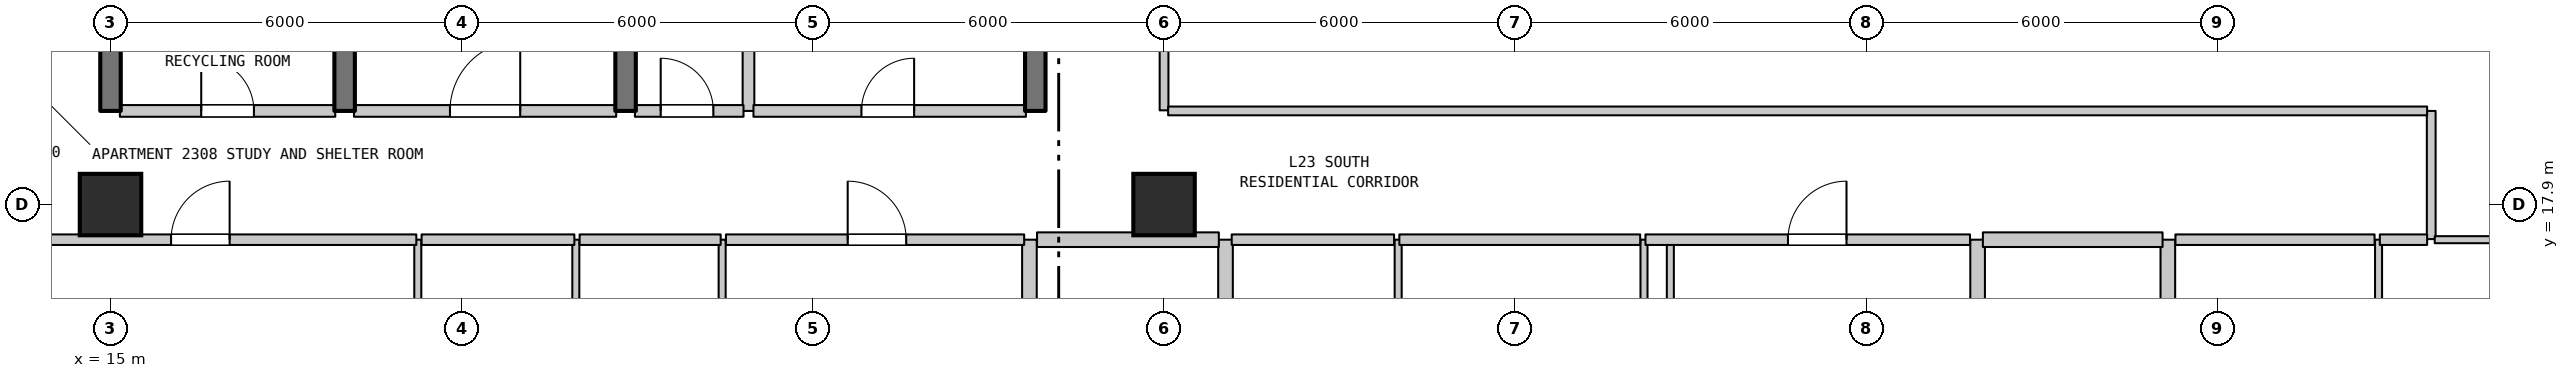
"""IFC4 building model, lengths in metres.
Left out: names, types, materials, properties, quantities, classifications, styles, units other than length and angle.
Written with IfcOpenShell. Run it as: python <this file> out.ifc"""

import sys

from ifc_helpers import new_model, si_unit, direction, frame, frame_2d, origin, origin_2d, place, context, subcontext, project, spatial, rectangle, extrude, element, fill, save


model = new_model("IFC4")
c1 = context("Model", 3, precision=1e-05, world=origin(), true_north=direction((0.0, 1.0)))
c2 = subcontext(c1, "Body", "Model", "MODEL_VIEW")
j1 = project(units=[si_unit("LENGTHUNIT", "METRE"), si_unit("PLANEANGLEUNIT", "RADIAN")], contexts=[c1])
p1 = place(None, origin())
s1 = spatial("IfcSite", under=j1, at=p1, CompositionType="ELEMENT")
p2 = place(p1, origin())
s2 = spatial("IfcBuilding", under=s1, at=p2, CompositionType="ELEMENT")
p3 = place(p2, frame((0.0, 0.0, 98.3)))
s3 = spatial("IfcBuildingStorey", under=s2, at=p3, CompositionType="ELEMENT", Elevation=98.3)
for number, where, z_axis, x_axis in (
    (1, (15.0, 17.9, 0.0), (0.0, 0.0, 1.0), (1.0, 0.0, 0.0)),
    (2, (33.0, 17.9, 0.0), (0.0, 0.0, 1.0), (1.0, 0.0, 0.0)),
):
    element("IfcColumn", number, at=place(p3, frame(where, z_axis=z_axis, x_axis=x_axis)), inside=s3, PredefinedType="COLUMN", context=c2, shape_type="SweptSolid", body=[
        extrude(rectangle(XDim=1.05, YDim=1.05, at=origin_2d()), origin(), (0.0, 0.0, 1.0), 3.7),
    ])
for number, where, z_axis, x_axis in (
    (3, (15.0, 19.5, 0.0), (0.0, 0.0, 1.0), (0.0, 1.0, 0.0)),
    (4, (19.0, 19.5, 0.0), (0.0, 0.0, 1.0), (0.0, 1.0, 0.0)),
):
    element("IfcWall", number, at=place(p3, frame(where, z_axis=z_axis, x_axis=x_axis)), inside=s3, PredefinedType="SHEAR", context=c2, shape_type="SweptSolid", body=[
        extrude(rectangle(XDim=3.2, YDim=0.35, at=frame_2d((1.6, 0.0))), origin(), (0.0, 0.0, 1.0), 3.385),
    ])
p4 = place(p3, frame((20.25, 14.1, 0.0), z_axis=(0.0, 0.0, 1.0), x_axis=(0.0, 1.0, 0.0)))
e5 = element("IfcWall", 5, at=p4, inside=s3, PredefinedType="PARTITIONING", context=c2, shape_type="SweptSolid", body=[
    extrude(rectangle(XDim=3.2, YDim=0.12, at=frame_2d((1.6, 0.0))), origin(), (0.0, 0.0, 1.0), 3.385),
])
p5 = place(p4, frame((1.15, 0.0, 0.0)))
e6 = element("IfcOpeningElement", 6, at=p5, cuts=e5, PredefinedType="OPENING", context=c2, shape_type="SweptSolid", body=[
    extrude(rectangle(XDim=0.9, YDim=2.15, at=frame_2d((0.45, 1.075))), frame((0.0, 0.07, 0.0), z_axis=(0.0, -1.0, 0.0), x_axis=(1.0, 0.0, 0.0)), (0.0, 0.0, 1.0), 0.14),
])
p6 = place(p3, frame((22.95, 14.1, 0.0), z_axis=(0.0, 0.0, 1.0), x_axis=(0.0, 1.0, 0.0)))
e7 = element("IfcWall", 7, at=p6, inside=s3, PredefinedType="PARTITIONING", context=c2, shape_type="SweptSolid", body=[
    extrude(rectangle(XDim=3.2, YDim=0.12, at=frame_2d((1.6, 0.0))), origin(), (0.0, 0.0, 1.0), 3.385),
])
p7 = place(p3, frame((23.8, 19.5, 0.0), z_axis=(0.0, 0.0, 1.0), x_axis=(0.0, 1.0, 0.0)))
e8 = element("IfcWall", 8, at=p7, inside=s3, PredefinedType="SHEAR", context=c2, shape_type="SweptSolid", body=[
    extrude(rectangle(XDim=3.2, YDim=0.35, at=frame_2d((1.6, 0.0))), origin(), (0.0, 0.0, 1.0), 3.385),
])
p8 = place(p3, frame((25.45, 14.85, 0.0), z_axis=(0.0, 0.0, 1.0), x_axis=(0.0, 1.0, 0.0)))
e9 = element("IfcWall", 9, at=p8, inside=s3, PredefinedType="PARTITIONING", context=c2, shape_type="SweptSolid", body=[
    extrude(rectangle(XDim=2.45, YDim=0.12, at=frame_2d((1.225, 0.0))), origin(), (0.0, 0.0, 1.0), 3.385),
])
p9 = place(p3, frame((25.9, 19.5, 0.0), z_axis=(0.0, 0.0, 1.0), x_axis=(0.0, 1.0, 0.0)))
e10 = element("IfcWall", 10, at=p9, inside=s3, PredefinedType="STANDARD", context=c2, shape_type="SweptSolid", body=[
    extrude(rectangle(XDim=3.2, YDim=0.2, at=frame_2d((1.6, 0.0))), origin(), (0.0, 0.0, 1.0), 3.385),
])
p10 = place(p3, frame((30.7, 11.15, 0.0), z_axis=(0.0, 0.0, 1.0), x_axis=(0.0, 1.0, 0.0)))
e11 = element("IfcWall", 11, at=p10, inside=s3, PredefinedType="STANDARD", context=c2, shape_type="SweptSolid", body=[
    extrude(rectangle(XDim=6.15, YDim=0.25, at=frame_2d((3.075, 0.0))), origin(), (0.0, 0.0, 1.0), 3.385),
])
p11 = place(p3, frame((30.8, 19.5, 0.0), z_axis=(0.0, 0.0, 1.0), x_axis=(0.0, 1.0, 0.0)))
e12 = element("IfcWall", 12, at=p11, inside=s3, PredefinedType="SHEAR", context=c2, shape_type="SweptSolid", body=[
    extrude(rectangle(XDim=3.2, YDim=0.35, at=frame_2d((1.6, 0.0))), origin(), (0.0, 0.0, 1.0), 3.385),
])
p12 = place(p3, frame((33.0, 19.51, 0.0), z_axis=(0.0, 0.0, 1.0), x_axis=(0.0, 1.0, 0.0)))
e13 = element("IfcWall", 13, at=p12, inside=s3, PredefinedType="STANDARD", context=c2, shape_type="SweptSolid", body=[
    extrude(rectangle(XDim=6.18, YDim=0.15, at=frame_2d((3.09, 0.0))), origin(), (0.0, 0.0, 1.0), 2.935),
])
p13 = place(p3, frame((34.05, 11.15, 0.0), z_axis=(0.0, 0.0, 1.0), x_axis=(0.0, 1.0, 0.0)))
e14 = element("IfcWall", 14, at=p13, inside=s3, PredefinedType="STANDARD", context=c2, shape_type="SweptSolid", body=[
    extrude(rectangle(XDim=6.15, YDim=0.25, at=frame_2d((3.075, 0.0))), origin(), (0.0, 0.0, 1.0), 3.385),
])
for number, where, z_axis, x_axis in (
    (15, (37.0, 11.15, 0.0), (0.0, 0.0, 1.0), (0.0, 1.0, 0.0)),
    (16, (41.2, 11.15, 0.0), (0.0, 0.0, 1.0), (0.0, 1.0, 0.0)),
):
    element("IfcWall", number, at=place(p3, frame(where, z_axis=z_axis, x_axis=x_axis)), inside=s3, PredefinedType="PARTITIONING", context=c2, shape_type="SweptSolid", body=[
        extrude(rectangle(XDim=6.15, YDim=0.12, at=frame_2d((3.075, 0.0))), origin(), (0.0, 0.0, 1.0), 3.385),
    ])
p14 = place(p3, frame((41.65, 14.85, 0.0), z_axis=(0.0, 0.0, 1.0), x_axis=(0.0, 1.0, 0.0)))
e17 = element("IfcWall", 17, at=p14, inside=s3, PredefinedType="PARTITIONING", context=c2, shape_type="SweptSolid", body=[
    extrude(rectangle(XDim=2.45, YDim=0.12, at=frame_2d((1.225, 0.0))), origin(), (0.0, 0.0, 1.0), 3.385),
])
for number, where, z_axis, x_axis in (
    (18, (46.9, 11.15, 0.0), (0.0, 0.0, 1.0), (0.0, 1.0, 0.0)),
    (19, (50.15, 11.15, 0.0), (0.0, 0.0, 1.0), (0.0, 1.0, 0.0)),
):
    element("IfcWall", number, at=place(p3, frame(where, z_axis=z_axis, x_axis=x_axis)), inside=s3, PredefinedType="STANDARD", context=c2, shape_type="SweptSolid", body=[
        extrude(rectangle(XDim=6.15, YDim=0.25, at=frame_2d((3.075, 0.0))), origin(), (0.0, 0.0, 1.0), 3.385),
    ])
p15 = place(p3, frame((53.75, 11.15, 0.0), z_axis=(0.0, 0.0, 1.0), x_axis=(0.0, 1.0, 0.0)))
e20 = element("IfcWall", 20, at=p15, inside=s3, PredefinedType="PARTITIONING", context=c2, shape_type="SweptSolid", body=[
    extrude(rectangle(XDim=6.15, YDim=0.12, at=frame_2d((3.075, 0.0))), origin(), (0.0, 0.0, 1.0), 3.385),
])
p16 = place(p3, frame((54.65, 17.31, 0.0), z_axis=(0.0, 0.0, 1.0), x_axis=(0.0, 1.0, 0.0)))
e21 = element("IfcWall", 21, at=p16, inside=s3, PredefinedType="STANDARD", context=c2, shape_type="SweptSolid", body=[
    extrude(rectangle(XDim=2.19, YDim=0.15, at=frame_2d((1.095, 0.0))), origin(), (0.0, 0.0, 1.0), 3.385),
])
p17 = place(p3, frame((12.875, 17.3, 0.0), z_axis=(0.0, 0.0, 1.0), x_axis=(1.0, 0.0, 0.0)))
e22 = element("IfcWall", 22, at=p17, inside=s3, PredefinedType="STANDARD", context=c2, shape_type="SweptSolid", body=[
    extrude(rectangle(XDim=7.35, YDim=0.18, at=frame_2d((3.675, 0.0))), origin(), (0.0, 0.0, 1.0), 3.385),
])
p18 = place(p17, frame((3.16, 0.0, 0.0)))
e23 = element("IfcOpeningElement", 23, at=p18, cuts=e22, PredefinedType="OPENING", context=c2, shape_type="SweptSolid", body=[
    extrude(rectangle(XDim=1.0, YDim=2.15, at=frame_2d((0.5, 1.075))), frame((0.0, 0.1, 0.0), z_axis=(0.0, -1.0, 0.0), x_axis=(1.0, 0.0, 0.0)), (0.0, 0.0, 1.0), 0.2),
])
p19 = place(p3, frame((20.315, 17.3, 0.0), z_axis=(0.0, 0.0, 1.0), x_axis=(1.0, 0.0, 0.0)))
e24 = element("IfcWall", 24, at=p19, inside=s3, PredefinedType="STANDARD", context=c2, shape_type="SweptSolid", body=[
    extrude(rectangle(XDim=2.61, YDim=0.18, at=frame_2d((1.305, 0.0))), origin(), (0.0, 0.0, 1.0), 3.385),
])
p20 = place(p3, frame((23.015, 17.3, 0.0), z_axis=(0.0, 0.0, 1.0), x_axis=(1.0, 0.0, 0.0)))
e25 = element("IfcWall", 25, at=p20, inside=s3, PredefinedType="STANDARD", context=c2, shape_type="SweptSolid", body=[
    extrude(rectangle(XDim=2.41, YDim=0.18, at=frame_2d((1.205, 0.0))), origin(), (0.0, 0.0, 1.0), 3.385),
])
p21 = place(p3, frame((25.515, 17.3, 0.0), z_axis=(0.0, 0.0, 1.0), x_axis=(1.0, 0.0, 0.0)))
e26 = element("IfcWall", 26, at=p21, inside=s3, PredefinedType="STANDARD", context=c2, shape_type="SweptSolid", body=[
    extrude(rectangle(XDim=5.095, YDim=0.18, at=frame_2d((2.548, 0.0))), origin(), (0.0, 0.0, 1.0), 3.385),
])
p22 = place(p21, frame((2.08, 0.0, 0.0)))
e27 = element("IfcOpeningElement", 27, at=p22, cuts=e26, PredefinedType="OPENING", context=c2, shape_type="SweptSolid", body=[
    extrude(rectangle(XDim=1.0, YDim=2.15, at=frame_2d((0.5, 1.075))), frame((0.0, 0.1, 0.0), z_axis=(0.0, -1.0, 0.0), x_axis=(1.0, 0.0, 0.0)), (0.0, 0.0, 1.0), 0.2),
])
p23 = place(p3, frame((30.83, 17.3, 0.0), z_axis=(0.0, 0.0, 1.0), x_axis=(1.0, 0.0, 0.0)))
e28 = element("IfcWall", 28, at=p23, inside=s3, PredefinedType="STANDARD", context=c2, shape_type="SweptSolid", body=[
    extrude(rectangle(XDim=3.106, YDim=0.25, at=frame_2d((1.553, 0.0))), origin(), (0.0, 0.0, 1.0), 3.385),
])
p24 = place(p3, frame((34.156, 17.3, 0.0), z_axis=(0.0, 0.0, 1.0), x_axis=(1.0, 0.0, 0.0)))
e29 = element("IfcWall", 29, at=p24, inside=s3, PredefinedType="STANDARD", context=c2, shape_type="SweptSolid", body=[
    extrude(rectangle(XDim=2.774, YDim=0.18, at=frame_2d((1.387, 0.0))), origin(), (0.0, 0.0, 1.0), 3.385),
])
p25 = place(p3, frame((37.02, 17.3, 0.0), z_axis=(0.0, 0.0, 1.0), x_axis=(1.0, 0.0, 0.0)))
e30 = element("IfcWall", 30, at=p25, inside=s3, PredefinedType="STANDARD", context=c2, shape_type="SweptSolid", body=[
    extrude(rectangle(XDim=4.115, YDim=0.18, at=frame_2d((2.058, 0.0))), origin(), (0.0, 0.0, 1.0), 3.385),
])
p26 = place(p3, frame((41.225, 17.3, 0.0), z_axis=(0.0, 0.0, 1.0), x_axis=(1.0, 0.0, 0.0)))
e31 = element("IfcWall", 31, at=p26, inside=s3, PredefinedType="STANDARD", context=c2, shape_type="SweptSolid", body=[
    extrude(rectangle(XDim=5.545, YDim=0.18, at=frame_2d((2.772, 0.0))), origin(), (0.0, 0.0, 1.0), 3.385),
])
p27 = place(p26, frame((2.435, 0.0, 0.0)))
e32 = element("IfcOpeningElement", 32, at=p27, cuts=e31, PredefinedType="OPENING", context=c2, shape_type="SweptSolid", body=[
    extrude(rectangle(XDim=1.0, YDim=2.15, at=frame_2d((0.5, 1.075))), frame((0.0, 0.1, 0.0), z_axis=(0.0, -1.0, 0.0), x_axis=(1.0, 0.0, 0.0)), (0.0, 0.0, 1.0), 0.2),
])
p28 = place(p3, frame((46.99, 17.3, 0.0), z_axis=(0.0, 0.0, 1.0), x_axis=(1.0, 0.0, 0.0)))
e33 = element("IfcWall", 33, at=p28, inside=s3, PredefinedType="STANDARD", context=c2, shape_type="SweptSolid", body=[
    extrude(rectangle(XDim=3.07, YDim=0.25, at=frame_2d((1.535, 0.0))), origin(), (0.0, 0.0, 1.0), 3.385),
])
p29 = place(p3, frame((50.28, 17.3, 0.0), z_axis=(0.0, 0.0, 1.0), x_axis=(1.0, 0.0, 0.0)))
e34 = element("IfcWall", 34, at=p29, inside=s3, PredefinedType="STANDARD", context=c2, shape_type="SweptSolid", body=[
    extrude(rectangle(XDim=3.402, YDim=0.18, at=frame_2d((1.701, 0.0))), origin(), (0.0, 0.0, 1.0), 3.385),
])
p30 = place(p3, frame((53.772, 17.3, 0.0), z_axis=(0.0, 0.0, 1.0), x_axis=(1.0, 0.0, 0.0)))
e35 = element("IfcWall", 35, at=p30, inside=s3, PredefinedType="STANDARD", context=c2, shape_type="SweptSolid", body=[
    extrude(rectangle(XDim=0.808, YDim=0.18, at=frame_2d((0.404, 0.0))), origin(), (0.0, 0.0, 1.0), 3.385),
])
p31 = place(p3, frame((54.71, 17.3, 0.0), z_axis=(0.0, 0.0, 1.0), x_axis=(1.0, 0.0, 0.0)))
e36 = element("IfcWall", 36, at=p31, inside=s3, PredefinedType="PARTITIONING", context=c2, shape_type="SweptSolid", body=[
    extrude(rectangle(XDim=1.635, YDim=0.12, at=frame_2d((0.817, 0.0))), origin(), (0.0, 0.0, 1.0), 3.385),
])
p32 = place(p3, frame((15.16, 19.5, 0.0), z_axis=(0.0, 0.0, 1.0), x_axis=(1.0, 0.0, 0.0)))
e37 = element("IfcWall", 37, at=p32, inside=s3, PredefinedType="STANDARD", context=c2, shape_type="SweptSolid", body=[
    extrude(rectangle(XDim=3.68, YDim=0.2, at=frame_2d((1.84, 0.0))), origin(), (0.0, 0.0, 1.0), 3.385),
])
p33 = place(p32, frame((1.39, 0.0, 0.0)))
e38 = element("IfcOpeningElement", 38, at=p33, cuts=e37, PredefinedType="OPENING", context=c2, shape_type="SweptSolid", body=[
    extrude(rectangle(XDim=0.9, YDim=2.15, at=frame_2d((0.45, 1.075))), frame((0.0, 0.11, 0.0), z_axis=(0.0, -1.0, 0.0), x_axis=(1.0, 0.0, 0.0)), (0.0, 0.0, 1.0), 0.22),
])
p34 = place(p3, frame((19.16, 19.5, 0.0), z_axis=(0.0, 0.0, 1.0), x_axis=(1.0, 0.0, 0.0)))
e39 = element("IfcWall", 39, at=p34, inside=s3, PredefinedType="STANDARD", context=c2, shape_type="SweptSolid", body=[
    extrude(rectangle(XDim=4.48, YDim=0.2, at=frame_2d((2.24, 0.0))), origin(), (0.0, 0.0, 1.0), 3.385),
])
p35 = place(p34, frame((1.64, 0.0, 0.0)))
e40 = element("IfcOpeningElement", 40, at=p35, cuts=e39, PredefinedType="OPENING", context=c2, shape_type="SweptSolid", body=[
    extrude(rectangle(XDim=1.2, YDim=2.2, at=frame_2d((0.6, 1.1))), frame((0.0, 0.11, 0.0), z_axis=(0.0, -1.0, 0.0), x_axis=(1.0, 0.0, 0.0)), (0.0, 0.0, 1.0), 0.22),
])
p36 = place(p3, frame((23.96, 19.5, 0.0), z_axis=(0.0, 0.0, 1.0), x_axis=(1.0, 0.0, 0.0)))
e41 = element("IfcWall", 41, at=p36, inside=s3, PredefinedType="STANDARD", context=c2, shape_type="SweptSolid", body=[
    extrude(rectangle(XDim=1.855, YDim=0.2, at=frame_2d((0.927, 0.0))), origin(), (0.0, 0.0, 1.0), 3.385),
])
p37 = place(p36, frame((0.44, 0.0, 0.0)))
e42 = element("IfcOpeningElement", 42, at=p37, cuts=e41, PredefinedType="OPENING", context=c2, shape_type="SweptSolid", body=[
    extrude(rectangle(XDim=0.9, YDim=2.15, at=frame_2d((0.45, 1.075))), frame((0.0, 0.11, 0.0), z_axis=(0.0, -1.0, 0.0), x_axis=(1.0, 0.0, 0.0)), (0.0, 0.0, 1.0), 0.22),
])
p38 = place(p3, frame((25.985, 19.5, 0.0), z_axis=(0.0, 0.0, 1.0), x_axis=(1.0, 0.0, 0.0)))
e43 = element("IfcWall", 43, at=p38, inside=s3, PredefinedType="STANDARD", context=c2, shape_type="SweptSolid", body=[
    extrude(rectangle(XDim=4.655, YDim=0.2, at=frame_2d((2.327, 0.0))), origin(), (0.0, 0.0, 1.0), 3.385),
])
p39 = place(p38, frame((1.845, 0.0, 0.0)))
e44 = element("IfcOpeningElement", 44, at=p39, cuts=e43, PredefinedType="OPENING", context=c2, shape_type="SweptSolid", body=[
    extrude(rectangle(XDim=0.9, YDim=2.15, at=frame_2d((0.45, 1.075))), frame((0.0, 0.11, 0.0), z_axis=(0.0, -1.0, 0.0), x_axis=(1.0, 0.0, 0.0)), (0.0, 0.0, 1.0), 0.22),
])
p40 = place(p3, frame((33.07, 19.5, 0.0), z_axis=(0.0, 0.0, 1.0), x_axis=(1.0, 0.0, 0.0)))
e45 = element("IfcWall", 45, at=p40, inside=s3, PredefinedType="STANDARD", context=c2, shape_type="SweptSolid", body=[
    extrude(rectangle(XDim=21.51, YDim=0.15, at=frame_2d((10.755, 0.0))), origin(), (0.0, 0.0, 1.0), 3.385),
])
p41 = place(p18, origin())
e46 = element("IfcDoor", 46, at=p41, inside=s3, OperationType="SINGLE_SWING_RIGHT", PredefinedType="DOOR", context=c2, shape_type="SweptSolid", body=[
    extrude(rectangle(XDim=1.0, YDim=2.15, at=frame_2d((0.5, 1.075))), frame((0.0, 0.025, 0.0), z_axis=(0.0, -1.0, 0.0), x_axis=(1.0, 0.0, 0.0)), (0.0, 0.0, 1.0), 0.05),
])
fill(e23, e46)
p42 = place(p22, origin())
e47 = element("IfcDoor", 47, at=p42, inside=s3, OperationType="SINGLE_SWING_LEFT", PredefinedType="DOOR", context=c2, shape_type="SweptSolid", body=[
    extrude(rectangle(XDim=1.0, YDim=2.15, at=frame_2d((0.5, 1.075))), frame((0.0, 0.025, 0.0), z_axis=(0.0, -1.0, 0.0), x_axis=(1.0, 0.0, 0.0)), (0.0, 0.0, 1.0), 0.05),
])
fill(e27, e47)
p43 = place(p27, origin())
e48 = element("IfcDoor", 48, at=p43, inside=s3, OperationType="SINGLE_SWING_RIGHT", PredefinedType="DOOR", context=c2, shape_type="SweptSolid", body=[
    extrude(rectangle(XDim=1.0, YDim=2.15, at=frame_2d((0.5, 1.075))), frame((0.0, 0.025, 0.0), z_axis=(0.0, -1.0, 0.0), x_axis=(1.0, 0.0, 0.0)), (0.0, 0.0, 1.0), 0.05),
])
fill(e32, e48)
p44 = place(p33, origin())
e49 = element("IfcDoor", 49, at=p44, inside=s3, OperationType="SINGLE_SWING_LEFT", PredefinedType="DOOR", context=c2, shape_type="SweptSolid", body=[
    extrude(rectangle(XDim=0.9, YDim=2.15, at=frame_2d((0.45, 1.075))), frame((0.0, 0.025, 0.0), z_axis=(0.0, -1.0, 0.0), x_axis=(1.0, 0.0, 0.0)), (0.0, 0.0, 1.0), 0.05),
])
fill(e38, e49)
p45 = place(p35, origin())
e50 = element("IfcDoor", 50, at=p45, inside=s3, OperationType="SINGLE_SWING_RIGHT", PredefinedType="DOOR", context=c2, shape_type="SweptSolid", body=[
    extrude(rectangle(XDim=1.2, YDim=2.2, at=frame_2d((0.6, 1.1))), frame((0.0, 0.025, 0.0), z_axis=(0.0, -1.0, 0.0), x_axis=(1.0, 0.0, 0.0)), (0.0, 0.0, 1.0), 0.05),
])
fill(e40, e50)
p46 = place(p37, origin())
e51 = element("IfcDoor", 51, at=p46, inside=s3, OperationType="SINGLE_SWING_LEFT", PredefinedType="DOOR", context=c2, shape_type="SweptSolid", body=[
    extrude(rectangle(XDim=0.9, YDim=2.15, at=frame_2d((0.45, 1.075))), frame((0.0, 0.025, 0.0), z_axis=(0.0, -1.0, 0.0), x_axis=(1.0, 0.0, 0.0)), (0.0, 0.0, 1.0), 0.05),
])
fill(e42, e51)
p47 = place(p39, origin())
e52 = element("IfcDoor", 52, at=p47, inside=s3, OperationType="SINGLE_SWING_RIGHT", PredefinedType="DOOR", context=c2, shape_type="SweptSolid", body=[
    extrude(rectangle(XDim=0.9, YDim=2.15, at=frame_2d((0.45, 1.075))), frame((0.0, 0.025, 0.0), z_axis=(0.0, -1.0, 0.0), x_axis=(1.0, 0.0, 0.0)), (0.0, 0.0, 1.0), 0.05),
])
fill(e44, e52)
save(model, sys.argv[1])
